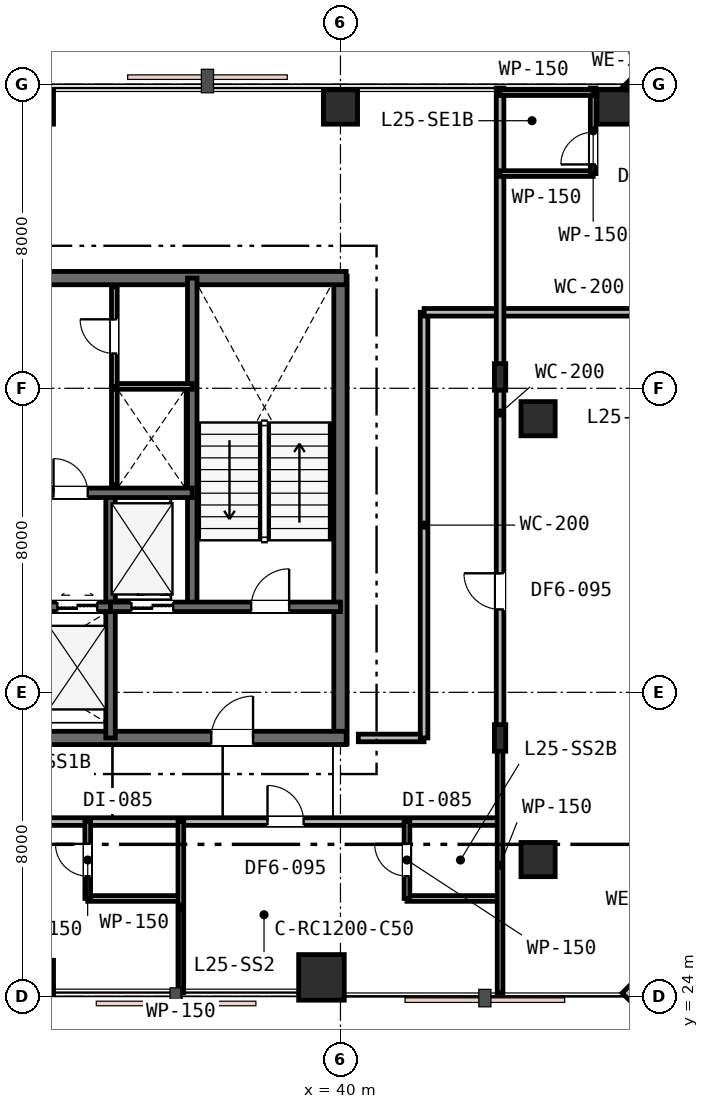
"""IFC4 building model, lengths in metres.
Left out: names, types, materials, properties, quantities, classifications, styles, units other than length and angle.
Written with IfcOpenShell. Run it as: python <this file> out.ifc"""

import sys

from ifc_helpers import new_model, si_unit, direction, frame, frame_2d, origin, origin_2d, place, context, subcontext, project, spatial, rectangle, i_section, extrude, element, fill, save


model = new_model("IFC4")
c1 = context("Model", 3, precision=1e-05, world=origin(), true_north=direction((0.0, 1.0)))
c2 = subcontext(c1, "Body", "Model", "MODEL_VIEW")
j1 = project(units=[si_unit("LENGTHUNIT", "METRE"), si_unit("PLANEANGLEUNIT", "RADIAN")], contexts=[c1])
p1 = place(None, origin())
s1 = spatial("IfcSite", under=j1, at=p1, CompositionType="ELEMENT")
p2 = place(p1, origin())
s2 = spatial("IfcBuilding", under=s1, at=p2, CompositionType="ELEMENT")
p3 = place(p2, frame((0.0, 0.0, 100.8)))
s3 = spatial("IfcBuildingStorey", under=s2, at=p3, CompositionType="ELEMENT", Elevation=100.8)
p4 = place(p3, frame((40.0, 30.65, 0.0), z_axis=(0.0, 0.0, 1.0), x_axis=(0.0, 1.0, 0.0)))
e1 = element("IfcWall", 1, at=p4, inside=s3, PredefinedType="SHEAR", context=c2, shape_type="SweptSolid", body=[
    extrude(rectangle(XDim=12.3, YDim=0.35, at=frame_2d((6.15, 0.0))), origin(), (0.0, 0.0, 1.0), 3.6),
])
p5 = place(p3, frame((15.85, 42.9, 0.0), z_axis=(0.0, 0.0, 1.0), x_axis=(1.0, 0.0, 0.0)))
e2 = element("IfcWall", 2, at=p5, inside=s3, PredefinedType="SHEAR", context=c2, shape_type="SweptSolid", body=[
    extrude(rectangle(XDim=24.3, YDim=0.35, at=frame_2d((12.15, 0.0))), origin(), (0.0, 0.0, 1.0), 3.6),
])
p6 = place(p3, frame((28.95, 30.8, 0.0), z_axis=(0.0, 0.0, 1.0), x_axis=(1.0, 0.0, 0.0)))
e3 = element("IfcWall", 3, at=p6, inside=s3, PredefinedType="SHEAR", context=c2, shape_type="SweptSolid", body=[
    extrude(rectangle(XDim=11.2, YDim=0.35, at=frame_2d((5.6, 0.0))), origin(), (0.0, 0.0, 1.0), 3.6),
])
p7 = place(p6, frame((7.65, 0.0, 0.0)))
e4 = element("IfcOpeningElement", 4, at=p7, cuts=e3, PredefinedType="OPENING", context=c2, shape_type="SweptSolid", body=[
    extrude(rectangle(XDim=1.1, YDim=2.15, at=frame_2d((0.55, 1.075))), frame((0.0, 0.185, 0.0), z_axis=(0.0, -1.0, 0.0), x_axis=(1.0, 0.0, 0.0)), (0.0, 0.0, 1.0), 0.37),
])
p8 = place(p3, frame((36.1, 34.25, 0.0), z_axis=(0.0, 0.0, 1.0), x_axis=(0.0, 1.0, 0.0)))
e5 = element("IfcWall", 5, at=p8, inside=s3, PredefinedType="SHEAR", context=c2, shape_type="SweptSolid", body=[
    extrude(rectangle(XDim=8.65, YDim=0.25, at=frame_2d((4.325, 0.0))), origin(), (0.0, 0.0, 1.0), 3.6),
])
p9 = place(p3, frame((33.95, 30.8, 0.0), z_axis=(0.0, 0.0, 1.0), x_axis=(0.0, 1.0, 0.0)))
e6 = element("IfcWall", 6, at=p9, inside=s3, PredefinedType="SHEAR", context=c2, shape_type="SweptSolid", body=[
    extrude(rectangle(XDim=6.45, YDim=0.25, at=frame_2d((3.225, 0.0))), origin(), (0.0, 0.0, 1.0), 3.6),
])
p10 = place(p3, frame((33.95, 34.25, 0.0), z_axis=(0.0, 0.0, 1.0), x_axis=(1.0, 0.0, 0.0)))
e7 = element("IfcWall", 7, at=p10, inside=s3, PredefinedType="SHEAR", context=c2, shape_type="SweptSolid", body=[
    extrude(rectangle(XDim=6.05, YDim=0.25, at=frame_2d((3.025, 0.0))), origin(), (0.0, 0.0, 1.0), 3.6),
])
p11 = place(p10, frame((3.7, 0.0, 0.0)))
e8 = element("IfcOpeningElement", 8, at=p11, cuts=e7, PredefinedType="OPENING", context=c2, shape_type="SweptSolid", body=[
    extrude(rectangle(XDim=1.0, YDim=2.15, at=frame_2d((0.5, 1.075))), frame((0.0, 0.135, 0.0), z_axis=(0.0, -1.0, 0.0), x_axis=(1.0, 0.0, 0.0)), (0.0, 0.0, 1.0), 0.27),
])
p12 = place(p10, frame((0.55, 0.0, 0.0)))
e9 = element("IfcOpeningElement", 9, at=p12, cuts=e7, PredefinedType="OPENING", context=c2, shape_type="SweptSolid", body=[
    extrude(rectangle(XDim=1.1, YDim=2.15, at=frame_2d((0.55, 1.075))), frame((0.0, 0.135, 0.0), z_axis=(0.0, -1.0, 0.0), x_axis=(1.0, 0.0, 0.0)), (0.0, 0.0, 1.0), 0.27),
])
p13 = place(p3, frame((28.95, 34.25, 0.0), z_axis=(0.0, 0.0, 1.0), x_axis=(1.0, 0.0, 0.0)))
e10 = element("IfcWall", 10, at=p13, inside=s3, PredefinedType="SHEAR", context=c2, shape_type="SweptSolid", body=[
    extrude(rectangle(XDim=5.0, YDim=0.25, at=frame_2d((2.5, 0.0))), origin(), (0.0, 0.0, 1.0), 3.6),
])
p14 = place(p13, frame((0.3, 0.0, 0.0)))
e11 = element("IfcOpeningElement", 11, at=p14, cuts=e10, PredefinedType="OPENING", context=c2, shape_type="SweptSolid", body=[
    extrude(rectangle(XDim=1.05, YDim=2.15, at=frame_2d((0.525, 1.075))), frame((0.0, 0.135, 0.0), z_axis=(0.0, -1.0, 0.0), x_axis=(1.0, 0.0, 0.0)), (0.0, 0.0, 1.0), 0.27),
])
p15 = place(p13, frame((1.95, 0.0, 0.0)))
e12 = element("IfcOpeningElement", 12, at=p15, cuts=e10, PredefinedType="OPENING", context=c2, shape_type="SweptSolid", body=[
    extrude(rectangle(XDim=1.05, YDim=2.15, at=frame_2d((0.525, 1.075))), frame((0.0, 0.135, 0.0), z_axis=(0.0, -1.0, 0.0), x_axis=(1.0, 0.0, 0.0)), (0.0, 0.0, 1.0), 0.27),
])
p16 = place(p13, frame((3.6, 0.0, 0.0)))
e13 = element("IfcOpeningElement", 13, at=p16, cuts=e10, PredefinedType="OPENING", context=c2, shape_type="SweptSolid", body=[
    extrude(rectangle(XDim=1.05, YDim=2.15, at=frame_2d((0.525, 1.075))), frame((0.0, 0.135, 0.0), z_axis=(0.0, -1.0, 0.0), x_axis=(1.0, 0.0, 0.0)), (0.0, 0.0, 1.0), 0.27),
])
p17 = place(p3, frame((19.9, 37.25, 0.0), z_axis=(0.0, 0.0, 1.0), x_axis=(1.0, 0.0, 0.0)))
e14 = element("IfcWall", 14, at=p17, inside=s3, PredefinedType="SHEAR", context=c2, shape_type="SweptSolid", body=[
    extrude(rectangle(XDim=16.2, YDim=0.25, at=frame_2d((8.1, 0.0))), origin(), (0.0, 0.0, 1.0), 3.6),
])
p18 = place(p17, frame((12.55, 0.0, 0.0)))
e15 = element("IfcOpeningElement", 15, at=p18, cuts=e14, PredefinedType="OPENING", context=c2, shape_type="SweptSolid", body=[
    extrude(rectangle(XDim=0.9, YDim=2.15, at=frame_2d((0.45, 1.075))), frame((0.0, 0.135, 0.0), z_axis=(0.0, -1.0, 0.0), x_axis=(1.0, 0.0, 0.0)), (0.0, 0.0, 1.0), 0.27),
])
p19 = place(p3, frame((32.0, 24.5, 0.0), z_axis=(0.0, 0.0, 1.0), x_axis=(1.0, 0.0, 0.0)))
e16 = element("IfcColumn", 16, at=p19, inside=s3, PredefinedType="COLUMN", context=c2, shape_type="SweptSolid", body=[
    extrude(rectangle(XDim=0.9, YDim=0.9, at=origin_2d()), origin(), (0.0, 0.0, 1.0), 3.6),
])
p20 = place(p3, frame((39.5, 24.5, 0.0), z_axis=(0.0, 0.0, 1.0), x_axis=(1.0, 0.0, 0.0)))
e17 = element("IfcColumn", 17, at=p20, inside=s3, PredefinedType="COLUMN", context=c2, shape_type="SweptSolid", body=[
    extrude(rectangle(XDim=1.2, YDim=1.2, at=origin_2d()), origin(), (0.0, 0.0, 1.0), 3.6),
])
for number, where, z_axis, x_axis in (
    (18, (45.2, 27.6, 0.0), (0.0, 0.0, 1.0), (1.0, 0.0, 0.0)),
    (19, (45.2, 39.2, 0.0), (0.0, 0.0, 1.0), (1.0, 0.0, 0.0)),
    (20, (32.0, 47.4, 0.0), (0.0, 0.0, 1.0), (1.0, 0.0, 0.0)),
    (21, (40.0, 47.4, 0.0), (0.0, 0.0, 1.0), (1.0, 0.0, 0.0)),
    (22, (47.2, 47.4, 0.0), (0.0, 0.0, 1.0), (1.0, 0.0, 0.0)),
):
    element("IfcColumn", number, at=place(p3, frame(where, z_axis=z_axis, x_axis=x_axis)), inside=s3, PredefinedType="COLUMN", context=c2, shape_type="SweptSolid", body=[
        extrude(rectangle(XDim=0.9, YDim=0.9, at=origin_2d()), origin(), (0.0, 0.0, 1.0), 3.6),
    ])
for number, where, z_axis, x_axis in (
    (23, (44.2, 30.8, 0.0), (0.0, 0.0, 1.0), (1.0, 0.0, 0.0)),
    (24, (44.2, 40.3, 0.0), (0.0, 0.0, 1.0), (1.0, 0.0, 0.0)),
):
    element("IfcColumn", number, at=place(p3, frame(where, z_axis=z_axis, x_axis=x_axis)), inside=s3, PredefinedType="COLUMN", context=c2, shape_type="SweptSolid", body=[
        extrude(i_section(OverallWidth=0.3, OverallDepth=0.7, WebThickness=0.017, FlangeThickness=0.032, FilletRadius=0.027, at=origin_2d()), origin(), (0.0, 0.0, 1.0), 3.6),
    ])
p21 = place(p3, frame((47.5, 24.0, 0.0), z_axis=(0.0, 0.0, 1.0), x_axis=(0.707106781187, 0.707106781187, 0.0)))
e25 = element("IfcWall", 25, at=p21, inside=s3, PredefinedType="STANDARD", context=c2, shape_type="SweptSolid", body=[
    extrude(rectangle(XDim=4.95, YDim=0.25, at=frame_2d((2.475, 0.0))), origin(), (0.0, 0.0, 1.0), 3.33),
])
p22 = place(p21, frame((1.875, 0.0, 0.85)))
e26 = element("IfcOpeningElement", 26, at=p22, cuts=e25, PredefinedType="OPENING", context=c2, shape_type="SweptSolid", body=[
    extrude(rectangle(XDim=1.2, YDim=1.6, at=frame_2d((0.6, 0.8))), frame((0.0, 0.135, 0.0), z_axis=(0.0, -1.0, 0.0), x_axis=(1.0, 0.0, 0.0)), (0.0, 0.0, 1.0), 0.27),
])
p23 = place(p3, frame((47.562, 47.938, 0.0), z_axis=(0.0, 0.0, 1.0), x_axis=(-0.707106781187, 0.707106781187, 0.0)))
e27 = element("IfcWall", 27, at=p23, inside=s3, PredefinedType="STANDARD", context=c2, shape_type="SweptSolid", body=[
    extrude(rectangle(XDim=0.087, YDim=0.25, at=frame_2d((0.044, 0.0))), origin(), (0.0, 0.0, 1.0), 3.33),
])
p24 = place(p3, frame((34.05, 37.473, 0.0), z_axis=(0.0, 0.0, 1.0), x_axis=(0.0, 1.0, 0.0)))
e28 = element("IfcWall", 28, at=p24, inside=s3, PredefinedType="PLUMBINGWALL", context=c2, shape_type="SweptSolid", body=[
    extrude(rectangle(XDim=2.577, YDim=0.15, at=frame_2d((1.288, 0.0))), origin(), (0.0, 0.0, 1.0), 3.33),
])
p25 = place(p3, frame((34.05, 40.05, 0.0), z_axis=(0.0, 0.0, 1.0), x_axis=(1.0, 0.0, 0.0)))
e29 = element("IfcWall", 29, at=p25, inside=s3, PredefinedType="PARTITIONING", context=c2, shape_type="SweptSolid", body=[
    extrude(rectangle(XDim=2.05, YDim=0.15, at=frame_2d((1.025, 0.0))), origin(), (0.0, 0.0, 1.0), 3.33),
])
p26 = place(p3, frame((34.05, 40.05, 0.0), z_axis=(0.0, 0.0, 1.0), x_axis=(0.0, 1.0, 0.0)))
e30 = element("IfcWall", 30, at=p26, inside=s3, PredefinedType="PARTITIONING", context=c2, shape_type="SweptSolid", body=[
    extrude(rectangle(XDim=2.63, YDim=0.15, at=frame_2d((1.315, 0.0))), origin(), (0.0, 0.0, 1.0), 3.33),
])
p27 = place(p26, frame((0.865, 0.0, 0.0)))
e31 = element("IfcOpeningElement", 31, at=p27, cuts=e30, PredefinedType="OPENING", context=c2, shape_type="SweptSolid", body=[
    extrude(rectangle(XDim=0.9, YDim=2.15, at=frame_2d((0.45, 1.075))), frame((0.0, 0.085, 0.0), z_axis=(0.0, -1.0, 0.0), x_axis=(1.0, 0.0, 0.0)), (0.0, 0.0, 1.0), 0.17),
])
p28 = place(p3, frame((15.4, 28.6, 0.0), z_axis=(0.0, 0.0, 1.0), x_axis=(1.0, 0.0, 0.0)))
e32 = element("IfcWall", 32, at=p28, inside=s3, PredefinedType="PARTITIONING", context=c2, shape_type="SweptSolid", body=[
    extrude(rectangle(XDim=28.8, YDim=0.2, at=frame_2d((14.4, 0.0))), origin(), (0.0, 0.0, 1.0), 2.87),
])
p29 = place(p28, frame((12.41, 0.0, 0.0)))
e33 = element("IfcOpeningElement", 33, at=p29, cuts=e32, PredefinedType="OPENING", context=c2, shape_type="SweptSolid", body=[
    extrude(rectangle(XDim=0.95, YDim=2.15, at=frame_2d((0.475, 1.075))), frame((0.0, 0.11, 0.0), z_axis=(0.0, -1.0, 0.0), x_axis=(1.0, 0.0, 0.0)), (0.0, 0.0, 1.0), 0.22),
])
p30 = place(p28, frame((22.68, 0.0, 0.0)))
e34 = element("IfcOpeningElement", 34, at=p30, cuts=e32, PredefinedType="OPENING", context=c2, shape_type="SweptSolid", body=[
    extrude(rectangle(XDim=0.95, YDim=2.15, at=frame_2d((0.475, 1.075))), frame((0.0, 0.11, 0.0), z_axis=(0.0, -1.0, 0.0), x_axis=(1.0, 0.0, 0.0)), (0.0, 0.0, 1.0), 0.22),
])
p31 = place(p3, frame((40.47, 30.8, 0.0), z_axis=(0.0, 0.0, 1.0), x_axis=(1.0, 0.0, 0.0)))
e35 = element("IfcWall", 35, at=p31, inside=s3, PredefinedType="PARTITIONING", context=c2, shape_type="SweptSolid", body=[
    extrude(rectangle(XDim=1.73, YDim=0.2, at=frame_2d((0.865, 0.0))), origin(), (0.0, 0.0, 1.0), 2.87),
])
p32 = place(p3, frame((42.2, 30.8, 0.0), z_axis=(0.0, 0.0, 1.0), x_axis=(0.0, 1.0, 0.0)))
e36 = element("IfcWall", 36, at=p32, inside=s3, PredefinedType="PARTITIONING", context=c2, shape_type="SweptSolid", body=[
    extrude(rectangle(XDim=11.2, YDim=0.2, at=frame_2d((5.6, 0.0))), origin(), (0.0, 0.0, 1.0), 2.87),
])
p33 = place(p3, frame((42.2, 42.0, 0.0), z_axis=(0.0, 0.0, 1.0), x_axis=(1.0, 0.0, 0.0)))
e37 = element("IfcWall", 37, at=p33, inside=s3, PredefinedType="PARTITIONING", context=c2, shape_type="SweptSolid", body=[
    extrude(rectangle(XDim=8.7, YDim=0.2, at=frame_2d((4.35, 0.0))), origin(), (0.0, 0.0, 1.0), 3.33),
])
p34 = place(p3, frame((33.35, 26.576, 0.0), z_axis=(0.0, 0.0, 1.0), x_axis=(1.0, 0.0, 0.0)))
e38 = element("IfcWall", 38, at=p34, inside=s3, PredefinedType="PARTITIONING", context=c2, shape_type="SweptSolid", body=[
    extrude(rectangle(XDim=2.45, YDim=0.15, at=frame_2d((1.225, 0.0))), origin(), (0.0, 0.0, 1.0), 3.01),
])
p35 = place(p3, frame((33.35, 26.576, 0.0), z_axis=(0.0, 0.0, 1.0), x_axis=(0.0, 1.0, 0.0)))
e39 = element("IfcWall", 39, at=p35, inside=s3, PredefinedType="PARTITIONING", context=c2, shape_type="SweptSolid", body=[
    extrude(rectangle(XDim=2.024, YDim=0.15, at=frame_2d((1.012, 0.0))), origin(), (0.0, 0.0, 1.0), 3.33),
])
p36 = place(p35, frame((0.587, 0.0, 0.0)))
e40 = element("IfcOpeningElement", 40, at=p36, cuts=e39, PredefinedType="OPENING", context=c2, shape_type="SweptSolid", body=[
    extrude(rectangle(XDim=0.85, YDim=2.15, at=frame_2d((0.425, 1.075))), frame((0.0, 0.085, 0.0), z_axis=(0.0, -1.0, 0.0), x_axis=(1.0, 0.0, 0.0)), (0.0, 0.0, 1.0), 0.17),
])
p37 = place(p3, frame((35.8, 28.6, 0.0), z_axis=(0.0, 0.0, 1.0), x_axis=(0.0, -1.0, 0.0)))
e41 = element("IfcWall", 41, at=p37, inside=s3, PredefinedType="PARTITIONING", context=c2, shape_type="SweptSolid", body=[
    extrude(rectangle(XDim=4.5, YDim=0.15, at=frame_2d((2.25, 0.0))), origin(), (0.0, 0.0, 1.0), 2.96),
])
p38 = place(p3, frame((41.75, 26.576, 0.0), z_axis=(0.0, 0.0, 1.0), x_axis=(1.0, 0.0, 0.0)))
e42 = element("IfcWall", 42, at=p38, inside=s3, PredefinedType="PARTITIONING", context=c2, shape_type="SweptSolid", body=[
    extrude(rectangle(XDim=2.45, YDim=0.15, at=frame_2d((1.225, 0.0))), origin(), (0.0, 0.0, 1.0), 3.33),
])
p39 = place(p3, frame((41.75, 26.576, 0.0), z_axis=(0.0, 0.0, 1.0), x_axis=(0.0, 1.0, 0.0)))
e43 = element("IfcWall", 43, at=p39, inside=s3, PredefinedType="PARTITIONING", context=c2, shape_type="SweptSolid", body=[
    extrude(rectangle(XDim=2.024, YDim=0.15, at=frame_2d((1.012, 0.0))), origin(), (0.0, 0.0, 1.0), 3.33),
])
p40 = place(p39, frame((0.587, 0.0, 0.0)))
e44 = element("IfcOpeningElement", 44, at=p40, cuts=e43, PredefinedType="OPENING", context=c2, shape_type="SweptSolid", body=[
    extrude(rectangle(XDim=0.85, YDim=2.15, at=frame_2d((0.425, 1.075))), frame((0.0, 0.085, 0.0), z_axis=(0.0, -1.0, 0.0), x_axis=(1.0, 0.0, 0.0)), (0.0, 0.0, 1.0), 0.17),
])
p41 = place(p3, frame((44.2, 30.8, 0.0), z_axis=(0.0, 0.0, 1.0), x_axis=(0.0, -1.0, 0.0)))
e45 = element("IfcWall", 45, at=p41, inside=s3, PredefinedType="PARTITIONING", context=c2, shape_type="SweptSolid", body=[
    extrude(rectangle(XDim=6.7, YDim=0.15, at=frame_2d((3.35, 0.0))), origin(), (0.0, 0.0, 1.0), 2.87),
])
p42 = place(p3, frame((44.2, 30.8, 0.0), z_axis=(0.0, 0.0, 1.0), x_axis=(0.0, 1.0, 0.0)))
e46 = element("IfcWall", 46, at=p42, inside=s3, PredefinedType="PARTITIONING", context=c2, shape_type="SweptSolid", body=[
    extrude(rectangle(XDim=17.1, YDim=0.2, at=frame_2d((8.55, 0.0))), origin(), (0.0, 0.0, 1.0), 2.87),
])
p43 = place(p42, frame((3.382, 0.0, 0.0)))
e47 = element("IfcOpeningElement", 47, at=p43, cuts=e46, PredefinedType="OPENING", context=c2, shape_type="SweptSolid", body=[
    extrude(rectangle(XDim=0.95, YDim=2.15, at=frame_2d((0.475, 1.075))), frame((0.0, 0.11, 0.0), z_axis=(0.0, -1.0, 0.0), x_axis=(1.0, 0.0, 0.0)), (0.0, 0.0, 1.0), 0.22),
])
p44 = place(p3, frame((44.2, 45.65, 0.0), z_axis=(0.0, 0.0, 1.0), x_axis=(1.0, 0.0, 0.0)))
e48 = element("IfcWall", 48, at=p44, inside=s3, PredefinedType="PARTITIONING", context=c2, shape_type="SweptSolid", body=[
    extrude(rectangle(XDim=2.45, YDim=0.15, at=frame_2d((1.225, 0.0))), origin(), (0.0, 0.0, 1.0), 3.33),
])
p45 = place(p3, frame((46.65, 45.65, 0.0), z_axis=(0.0, 0.0, 1.0), x_axis=(0.0, 1.0, 0.0)))
e49 = element("IfcWall", 49, at=p45, inside=s3, PredefinedType="PARTITIONING", context=c2, shape_type="SweptSolid", body=[
    extrude(rectangle(XDim=2.25, YDim=0.15, at=frame_2d((1.125, 0.0))), origin(), (0.0, 0.0, 1.0), 2.96),
])
p46 = place(p45, frame((0.24, 0.0, 0.0)))
e50 = element("IfcOpeningElement", 50, at=p46, cuts=e49, PredefinedType="OPENING", context=c2, shape_type="SweptSolid", body=[
    extrude(rectangle(XDim=0.85, YDim=2.15, at=frame_2d((0.425, 1.075))), frame((0.0, 0.085, 0.0), z_axis=(0.0, -1.0, 0.0), x_axis=(1.0, 0.0, 0.0)), (0.0, 0.0, 1.0), 0.17),
])
p47 = place(p3, frame((44.2, 47.78, 0.0), z_axis=(0.0, 0.0, 1.0), x_axis=(1.0, 0.0, 0.0)))
e51 = element("IfcWall", 51, at=p47, inside=s3, PredefinedType="PARTITIONING", context=c2, shape_type="SweptSolid", body=[
    extrude(rectangle(XDim=2.45, YDim=0.15, at=frame_2d((1.225, 0.0))), origin(), (0.0, 0.0, 1.0), 2.96),
])
p48 = place(p11, origin())
e52 = element("IfcDoor", 52, at=p48, inside=s3, OperationType="SINGLE_SWING_RIGHT", PredefinedType="DOOR", context=c2, shape_type="SweptSolid", body=[
    extrude(rectangle(XDim=1.0, YDim=2.15, at=frame_2d((0.5, 1.075))), frame((0.0, 0.025, 0.0), z_axis=(0.0, -1.0, 0.0), x_axis=(1.0, 0.0, 0.0)), (0.0, 0.0, 1.0), 0.05),
])
fill(e8, e52)
p49 = place(p7, origin())
e53 = element("IfcDoor", 53, at=p49, inside=s3, OperationType="SINGLE_SWING_RIGHT", PredefinedType="DOOR", context=c2, shape_type="SweptSolid", body=[
    extrude(rectangle(XDim=1.1, YDim=2.15, at=frame_2d((0.55, 1.075))), frame((0.0, 0.025, 0.0), z_axis=(0.0, -1.0, 0.0), x_axis=(1.0, 0.0, 0.0)), (0.0, 0.0, 1.0), 0.05),
])
fill(e4, e53)
p50 = place(p18, origin())
e54 = element("IfcDoor", 54, at=p50, inside=s3, OperationType="SINGLE_SWING_LEFT", PredefinedType="DOOR", context=c2, shape_type="SweptSolid", body=[
    extrude(rectangle(XDim=0.9, YDim=2.15, at=frame_2d((0.45, 1.075))), frame((0.0, 0.025, 0.0), z_axis=(0.0, -1.0, 0.0), x_axis=(1.0, 0.0, 0.0)), (0.0, 0.0, 1.0), 0.05),
])
fill(e15, e54)
p51 = place(p27, origin())
e55 = element("IfcDoor", 55, at=p51, inside=s3, OperationType="SINGLE_SWING_RIGHT", PredefinedType="DOOR", context=c2, shape_type="SweptSolid", body=[
    extrude(rectangle(XDim=0.9, YDim=2.15, at=frame_2d((0.45, 1.075))), frame((0.0, 0.025, 0.0), z_axis=(0.0, -1.0, 0.0), x_axis=(1.0, 0.0, 0.0)), (0.0, 0.0, 1.0), 0.05),
])
fill(e31, e55)
p52 = place(p36, origin())
e56 = element("IfcDoor", 56, at=p52, inside=s3, OperationType="SINGLE_SWING_RIGHT", PredefinedType="DOOR", context=c2, shape_type="SweptSolid", body=[
    extrude(rectangle(XDim=0.85, YDim=2.15, at=frame_2d((0.425, 1.075))), frame((0.0, 0.025, 0.0), z_axis=(0.0, -1.0, 0.0), x_axis=(1.0, 0.0, 0.0)), (0.0, 0.0, 1.0), 0.05),
])
fill(e40, e56)
p53 = place(p30, origin())
e57 = element("IfcDoor", 57, at=p53, inside=s3, OperationType="SINGLE_SWING_LEFT", PredefinedType="DOOR", context=c2, shape_type="SweptSolid", body=[
    extrude(rectangle(XDim=0.95, YDim=2.15, at=frame_2d((0.475, 1.075))), frame((0.0, 0.025, 0.0), z_axis=(0.0, -1.0, 0.0), x_axis=(1.0, 0.0, 0.0)), (0.0, 0.0, 1.0), 0.05),
])
fill(e34, e57)
p54 = place(p40, origin())
e58 = element("IfcDoor", 58, at=p54, inside=s3, OperationType="SINGLE_SWING_RIGHT", PredefinedType="DOOR", context=c2, shape_type="SweptSolid", body=[
    extrude(rectangle(XDim=0.85, YDim=2.15, at=frame_2d((0.425, 1.075))), frame((0.0, 0.025, 0.0), z_axis=(0.0, -1.0, 0.0), x_axis=(1.0, 0.0, 0.0)), (0.0, 0.0, 1.0), 0.05),
])
fill(e44, e58)
p55 = place(p43, origin())
e59 = element("IfcDoor", 59, at=p55, inside=s3, OperationType="SINGLE_SWING_RIGHT", PredefinedType="DOOR", context=c2, shape_type="SweptSolid", body=[
    extrude(rectangle(XDim=0.95, YDim=2.15, at=frame_2d((0.475, 1.075))), frame((0.0, 0.025, 0.0), z_axis=(0.0, -1.0, 0.0), x_axis=(1.0, 0.0, 0.0)), (0.0, 0.0, 1.0), 0.05),
])
fill(e47, e59)
p56 = place(p46, origin())
e60 = element("IfcDoor", 60, at=p56, inside=s3, OperationType="SINGLE_SWING_LEFT", PredefinedType="DOOR", context=c2, shape_type="SweptSolid", body=[
    extrude(rectangle(XDim=0.85, YDim=2.15, at=frame_2d((0.425, 1.075))), frame((0.0, 0.025, 0.0), z_axis=(0.0, -1.0, 0.0), x_axis=(1.0, 0.0, 0.0)), (0.0, 0.0, 1.0), 0.05),
])
fill(e50, e60)
p57 = place(p12, origin())
e61 = element("IfcDoor", 61, at=p57, inside=s3, OperationType="DOUBLE_DOOR_SLIDING", PredefinedType="DOOR", context=c2, shape_type="SweptSolid", body=[
    extrude(rectangle(XDim=1.1, YDim=2.15, at=frame_2d((0.55, 1.075))), frame((0.0, 0.025, 0.0), z_axis=(0.0, -1.0, 0.0), x_axis=(1.0, 0.0, 0.0)), (0.0, 0.0, 1.0), 0.05),
])
fill(e9, e61)
p58 = place(p16, origin())
e62 = element("IfcDoor", 62, at=p58, inside=s3, OperationType="DOUBLE_DOOR_SLIDING", PredefinedType="DOOR", context=c2, shape_type="SweptSolid", body=[
    extrude(rectangle(XDim=1.05, YDim=2.15, at=frame_2d((0.525, 1.075))), frame((0.0, 0.025, 0.0), z_axis=(0.0, -1.0, 0.0), x_axis=(1.0, 0.0, 0.0)), (0.0, 0.0, 1.0), 0.05),
])
fill(e13, e62)
save(model, sys.argv[1])
